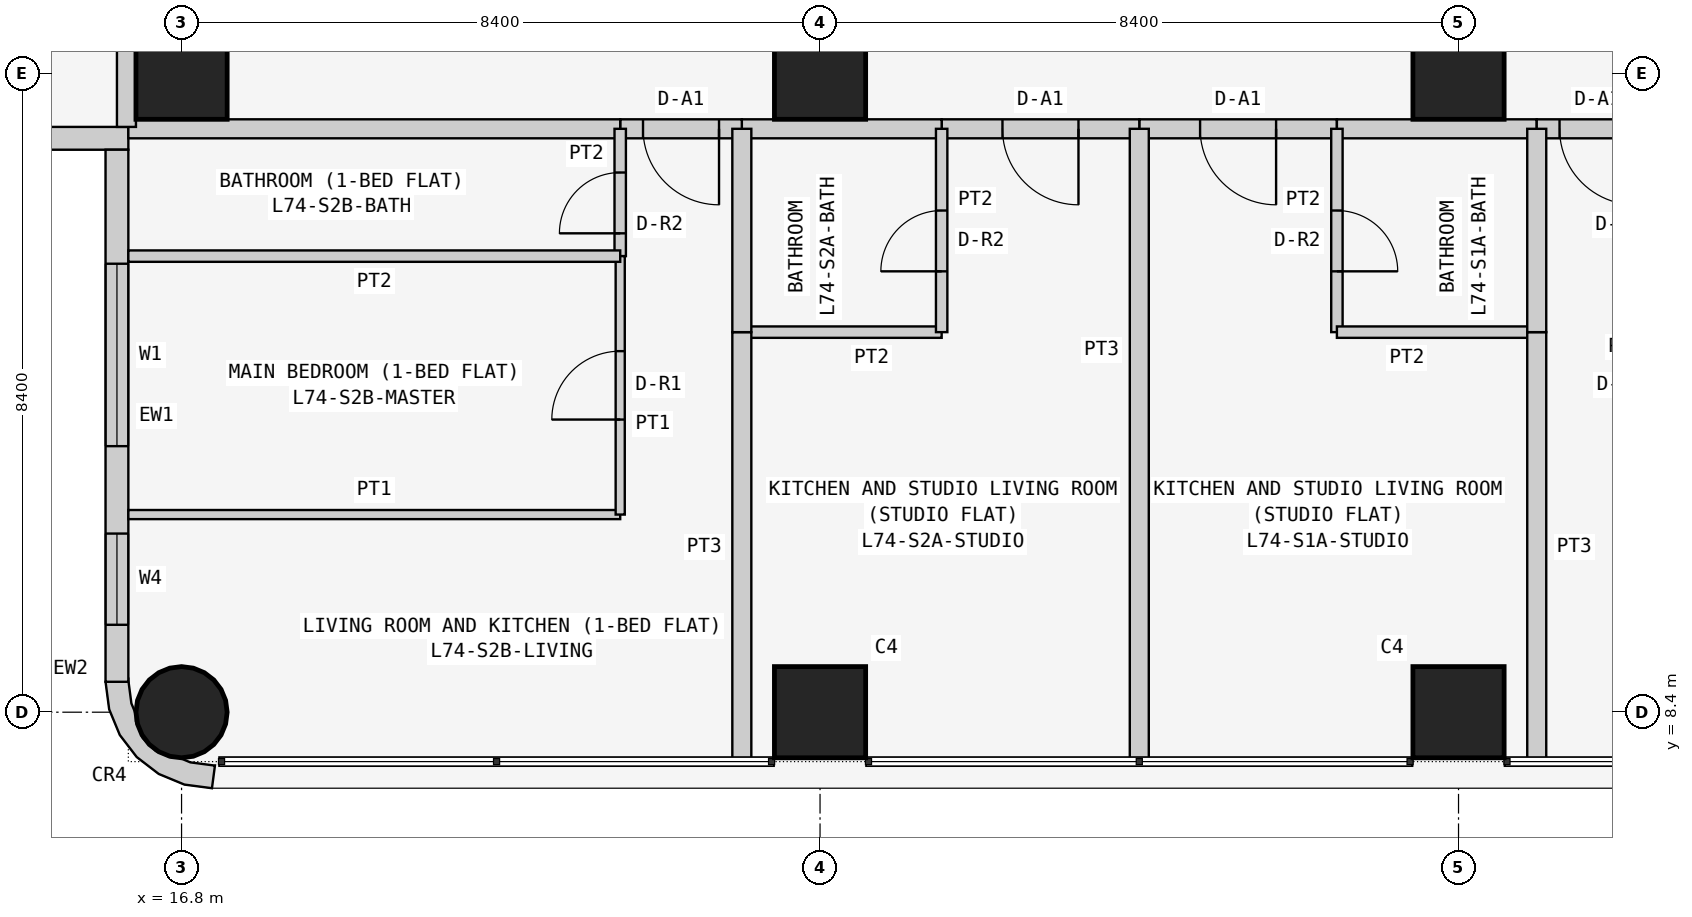
"""IFC4 building model, lengths in metres.
Left out: names, types, materials, properties, quantities, classifications, styles, units other than length and angle.
Written with IfcOpenShell. Run it as: python <this file> out.ifc"""

import sys

from ifc_helpers import new_model, si_unit, direction, frame, frame_2d, origin, origin_2d, place, context, subcontext, project, spatial, polyline, rectangle, circle, outline, extrude, element, fill, save


model = new_model("IFC4")
c1 = context("Model", 3, precision=1e-05, world=origin(), true_north=direction((0.0, 1.0)))
c2 = subcontext(c1, "Body", "Model", "MODEL_VIEW")
j1 = project(units=[si_unit("LENGTHUNIT", "METRE"), si_unit("PLANEANGLEUNIT", "RADIAN")], contexts=[c1])
p1 = place(None, origin())
s1 = spatial("IfcSite", under=j1, at=p1, CompositionType="ELEMENT")
p2 = place(p1, origin())
s2 = spatial("IfcBuilding", under=s1, at=p2, CompositionType="ELEMENT")
p3 = place(p2, frame((0.0, 0.0, 282.9)))
s3 = spatial("IfcBuildingStorey", under=s2, at=p3, CompositionType="ELEMENT", Elevation=282.9)
p4 = place(p3, frame((16.8, 8.4, 0.0), z_axis=(0.0, 0.0, 1.0), x_axis=(1.0, 0.0, 0.0)))
e1 = element("IfcColumn", 1, at=p4, inside=s3, PredefinedType="COLUMN", context=c2, shape_type="SweptSolid", body=[
    extrude(circle(Radius=0.6, at=origin_2d()), origin(), (0.0, 0.0, 1.0), 3.6),
])
for number, where, z_axis, x_axis in (
    (2, (16.8, 16.8, 0.0), (0.0, 0.0, 1.0), (1.0, 0.0, 0.0)),
    (3, (25.2, 8.4, 0.0), (0.0, 0.0, 1.0), (1.0, 0.0, 0.0)),
    (4, (25.2, 16.8, 0.0), (0.0, 0.0, 1.0), (1.0, 0.0, 0.0)),
    (5, (33.6, 8.4, 0.0), (0.0, 0.0, 1.0), (1.0, 0.0, 0.0)),
    (6, (33.6, 16.8, 0.0), (0.0, 0.0, 1.0), (1.0, 0.0, 0.0)),
):
    element("IfcColumn", number, at=place(p3, frame(where, z_axis=z_axis, x_axis=x_axis)), inside=s3, PredefinedType="COLUMN", context=c2, shape_type="SweptSolid", body=[
        extrude(rectangle(XDim=1.2, YDim=1.2, at=origin_2d()), origin(), (0.0, 0.0, 1.0), 3.6),
    ])
p5 = place(p3, frame((8.8, 15.95, 0.0), z_axis=(0.0, 0.0, 1.0), x_axis=(1.0, 0.0, 0.0)))
e7 = element("IfcWall", 7, at=p5, inside=s3, PredefinedType="SOLIDWALL", context=c2, shape_type="SweptSolid", body=[
    extrude(rectangle(XDim=7.3, YDim=0.3, at=frame_2d((3.65, 0.0))), origin(), (0.0, 0.0, 1.0), 3.45),
])
p6 = place(p5, frame((3.1, 0.0, 0.9)))
e8 = element("IfcOpeningElement", 8, at=p6, cuts=e7, PredefinedType="OPENING", context=c2, shape_type="SweptSolid", body=[
    extrude(rectangle(XDim=2.4, YDim=1.5, at=frame_2d((1.2, 0.75))), frame((0.0, 0.16, 0.0), z_axis=(0.0, -1.0, 0.0), x_axis=(1.0, 0.0, 0.0)), (0.0, 0.0, 1.0), 0.32),
])
p7 = place(p5, frame((0.75, 0.0, 0.9)))
e9 = element("IfcOpeningElement", 9, at=p7, cuts=e7, PredefinedType="OPENING", context=c2, shape_type="SweptSolid", body=[
    extrude(rectangle(XDim=1.2, YDim=1.5, at=frame_2d((0.6, 0.75))), frame((0.0, 0.16, 0.0), z_axis=(0.0, -1.0, 0.0), x_axis=(1.0, 0.0, 0.0)), (0.0, 0.0, 1.0), 0.32),
])
p8 = place(p3, frame((15.95, 15.8, 0.0), z_axis=(0.0, 0.0, 1.0), x_axis=(0.0, -1.0, 0.0)))
e10 = element("IfcWall", 10, at=p8, inside=s3, PredefinedType="SOLIDWALL", context=c2, shape_type="SweptSolid", body=[
    extrude(rectangle(XDim=7.0, YDim=0.3, at=frame_2d((3.5, 0.0))), origin(), (0.0, 0.0, 1.0), 3.45),
])
p9 = place(p8, frame((1.5, 0.0, 0.9)))
e11 = element("IfcOpeningElement", 11, at=p9, cuts=e10, PredefinedType="OPENING", context=c2, shape_type="SweptSolid", body=[
    extrude(rectangle(XDim=2.4, YDim=1.5, at=frame_2d((1.2, 0.75))), frame((0.0, 0.16, 0.0), z_axis=(0.0, -1.0, 0.0), x_axis=(1.0, 0.0, 0.0)), (0.0, 0.0, 1.0), 0.32),
])
p10 = place(p8, frame((5.05, 0.0, 0.9)))
e12 = element("IfcOpeningElement", 12, at=p10, cuts=e10, PredefinedType="OPENING", context=c2, shape_type="SweptSolid", body=[
    extrude(rectangle(XDim=1.2, YDim=1.5, at=frame_2d((0.6, 0.75))), frame((0.0, 0.16, 0.0), z_axis=(0.0, -1.0, 0.0), x_axis=(1.0, 0.0, 0.0)), (0.0, 0.0, 1.0), 0.32),
])
p11 = place(p3, frame((16.224, 8.762, 0.0), z_axis=(0.0, 0.0, 1.0), x_axis=(-0.707106781187, -0.707106781187, 0.0)))
e13 = element("IfcWall", 13, at=p11, inside=s3, PredefinedType="SOLIDWALL", context=c2, shape_type="SweptSolid", body=[
    extrude(outline(polyline([(0.033, 1.469), (0.047, 1.455), (0.233, 1.212), (0.292, 1.069), (0.358, 1.003), (0.449, 0.783), (0.449, 0.543), (0.358, 0.322), (0.292, 0.257), (0.233, 0.114), (0.047, -0.129), (0.033, -0.143), (0.273, -0.327), (0.495, -0.037), (0.635, 0.3), (0.683, 0.663), (0.635, 1.025), (0.495, 1.363), (0.273, 1.653), (0.033, 1.469)])), origin(), (0.0, 0.0, 1.0), 3.45),
])
p12 = place(p3, frame((32.0, 16.075, 0.0), z_axis=(0.0, 0.0, 1.0), x_axis=(-1.0, 0.0, 0.0)))
e14 = element("IfcWall", 14, at=p12, inside=s3, PredefinedType="PARTITIONING", context=c2, shape_type="SweptSolid", body=[
    extrude(rectangle(XDim=2.6, YDim=0.25, at=frame_2d((1.3, 0.0))), origin(), (0.0, 0.0, 1.0), 3.45),
])
p13 = place(p12, frame((0.8, 0.0, 0.0)))
e15 = element("IfcOpeningElement", 15, at=p13, cuts=e14, PredefinedType="OPENING", context=c2, shape_type="SweptSolid", body=[
    extrude(rectangle(XDim=1.0, YDim=2.1, at=frame_2d((0.5, 1.05))), frame((0.0, 0.135, 0.0), z_axis=(0.0, -1.0, 0.0), x_axis=(1.0, 0.0, 0.0)), (0.0, 0.0, 1.0), 0.27),
])
p14 = place(p3, frame((34.629, 16.075, 0.0), z_axis=(0.0, 0.0, 1.0), x_axis=(-1.0, 0.0, 0.0)))
e16 = element("IfcWall", 16, at=p14, inside=s3, PredefinedType="PARTITIONING", context=c2, shape_type="SweptSolid", body=[
    extrude(rectangle(XDim=2.629, YDim=0.25, at=frame_2d((1.314, 0.0))), origin(), (0.0, 0.0, 1.0), 3.45),
])
p15 = place(p3, frame((36.229, 16.075, 0.0), z_axis=(0.0, 0.0, 1.0), x_axis=(-1.0, 0.0, 0.0)))
e17 = element("IfcWall", 17, at=p15, inside=s3, PredefinedType="PARTITIONING", context=c2, shape_type="SweptSolid", body=[
    extrude(rectangle(XDim=1.6, YDim=0.25, at=frame_2d((0.8, 0.0))), origin(), (0.0, 0.0, 1.0), 3.45),
])
p16 = place(p15, frame((0.3, 0.0, 0.0)))
e18 = element("IfcOpeningElement", 18, at=p16, cuts=e17, PredefinedType="OPENING", context=c2, shape_type="SweptSolid", body=[
    extrude(rectangle(XDim=1.0, YDim=2.1, at=frame_2d((0.5, 1.05))), frame((0.0, 0.135, 0.0), z_axis=(0.0, -1.0, 0.0), x_axis=(1.0, 0.0, 0.0)), (0.0, 0.0, 1.0), 0.27),
])
p17 = place(p3, frame((29.4, 16.075, 0.0), z_axis=(0.0, 0.0, 1.0), x_axis=(-1.0, 0.0, 0.0)))
e19 = element("IfcWall", 19, at=p17, inside=s3, PredefinedType="PARTITIONING", context=c2, shape_type="SweptSolid", body=[
    extrude(rectangle(XDim=2.6, YDim=0.25, at=frame_2d((1.3, 0.0))), origin(), (0.0, 0.0, 1.0), 3.45),
])
p18 = place(p17, frame((0.8, 0.0, 0.0)))
e20 = element("IfcOpeningElement", 20, at=p18, cuts=e19, PredefinedType="OPENING", context=c2, shape_type="SweptSolid", body=[
    extrude(rectangle(XDim=1.0, YDim=2.1, at=frame_2d((0.5, 1.05))), frame((0.0, 0.135, 0.0), z_axis=(0.0, -1.0, 0.0), x_axis=(1.0, 0.0, 0.0)), (0.0, 0.0, 1.0), 0.27),
])
p19 = place(p3, frame((26.8, 16.075, 0.0), z_axis=(0.0, 0.0, 1.0), x_axis=(-1.0, 0.0, 0.0)))
e21 = element("IfcWall", 21, at=p19, inside=s3, PredefinedType="PARTITIONING", context=c2, shape_type="SweptSolid", body=[
    extrude(rectangle(XDim=2.629, YDim=0.25, at=frame_2d((1.314, 0.0))), origin(), (0.0, 0.0, 1.0), 3.45),
])
p20 = place(p3, frame((24.171, 16.075, 0.0), z_axis=(0.0, 0.0, 1.0), x_axis=(-1.0, 0.0, 0.0)))
e22 = element("IfcWall", 22, at=p20, inside=s3, PredefinedType="PARTITIONING", context=c2, shape_type="SweptSolid", body=[
    extrude(rectangle(XDim=1.6, YDim=0.25, at=frame_2d((0.8, 0.0))), origin(), (0.0, 0.0, 1.0), 3.45),
])
p21 = place(p20, frame((0.3, 0.0, 0.0)))
e23 = element("IfcOpeningElement", 23, at=p21, cuts=e22, PredefinedType="OPENING", context=c2, shape_type="SweptSolid", body=[
    extrude(rectangle(XDim=1.0, YDim=2.1, at=frame_2d((0.5, 1.05))), frame((0.0, 0.135, 0.0), z_axis=(0.0, -1.0, 0.0), x_axis=(1.0, 0.0, 0.0)), (0.0, 0.0, 1.0), 0.27),
])
p22 = place(p3, frame((22.571, 16.075, 0.0), z_axis=(0.0, 0.0, 1.0), x_axis=(-1.0, 0.0, 0.0)))
e24 = element("IfcWall", 24, at=p22, inside=s3, PredefinedType="PARTITIONING", context=c2, shape_type="SweptSolid", body=[
    extrude(rectangle(XDim=6.471, YDim=0.25, at=frame_2d((3.235, 0.0))), origin(), (0.0, 0.0, 1.0), 3.45),
])
p23 = place(p3, frame((16.075, 16.1, 0.0), z_axis=(0.0, 0.0, 1.0), x_axis=(0.0, 1.0, 0.0)))
e25 = element("IfcWall", 25, at=p23, inside=s3, PredefinedType="PARTITIONING", context=c2, shape_type="SweptSolid", body=[
    extrude(rectangle(XDim=6.871, YDim=0.25, at=frame_2d((3.436, 0.0))), origin(), (0.0, 0.0, 1.0), 3.45),
])
p24 = place(p3, frame((32.0, 16.075, 0.0), z_axis=(0.0, 0.0, 1.0), x_axis=(0.0, -1.0, 0.0)))
e26 = element("IfcWall", 26, at=p24, inside=s3, PredefinedType="PARTITIONING", context=c2, shape_type="SweptSolid", body=[
    extrude(rectangle(XDim=2.675, YDim=0.15, at=frame_2d((1.337, 0.0))), origin(), (0.0, 0.0, 1.0), 3.45),
])
p25 = place(p24, frame((1.075, 0.0, 0.0)))
e27 = element("IfcOpeningElement", 27, at=p25, cuts=e26, PredefinedType="OPENING", context=c2, shape_type="SweptSolid", body=[
    extrude(rectangle(XDim=0.8, YDim=2.1, at=frame_2d((0.4, 1.05))), frame((0.0, 0.085, 0.0), z_axis=(0.0, -1.0, 0.0), x_axis=(1.0, 0.0, 0.0)), (0.0, 0.0, 1.0), 0.17),
])
p26 = place(p3, frame((32.0, 13.4, 0.0), z_axis=(0.0, 0.0, 1.0), x_axis=(1.0, 0.0, 0.0)))
e28 = element("IfcWall", 28, at=p26, inside=s3, PredefinedType="PARTITIONING", context=c2, shape_type="SweptSolid", body=[
    extrude(rectangle(XDim=2.629, YDim=0.15, at=frame_2d((1.314, 0.0))), origin(), (0.0, 0.0, 1.0), 3.45),
])
p27 = place(p3, frame((34.629, 13.4, 0.0), z_axis=(0.0, 0.0, 1.0), x_axis=(0.0, -1.0, 0.0)))
e29 = element("IfcWall", 29, at=p27, inside=s3, PredefinedType="PARTITIONING", context=c2, shape_type="SweptSolid", body=[
    extrude(rectangle(XDim=5.65, YDim=0.25, at=frame_2d((2.825, 0.0))), origin(), (0.0, 0.0, 1.0), 3.45),
])
p28 = place(p3, frame((29.4, 7.75, 0.0), z_axis=(0.0, 0.0, 1.0), x_axis=(0.0, 1.0, 0.0)))
e30 = element("IfcWall", 30, at=p28, inside=s3, PredefinedType="PARTITIONING", context=c2, shape_type="SweptSolid", body=[
    extrude(rectangle(XDim=8.325, YDim=0.25, at=frame_2d((4.163, 0.0))), origin(), (0.0, 0.0, 1.0), 2.848),
])
p29 = place(p3, frame((34.629, 13.4, 0.0), z_axis=(0.0, 0.0, 1.0), x_axis=(0.0, 1.0, 0.0)))
e31 = element("IfcWall", 31, at=p29, inside=s3, PredefinedType="PARTITIONING", context=c2, shape_type="SweptSolid", body=[
    extrude(rectangle(XDim=2.675, YDim=0.25, at=frame_2d((1.337, 0.0))), origin(), (0.0, 0.0, 1.0), 3.45),
])
p30 = place(p3, frame((24.171, 13.4, 0.0), z_axis=(0.0, 0.0, 1.0), x_axis=(1.0, 0.0, 0.0)))
e32 = element("IfcWall", 32, at=p30, inside=s3, PredefinedType="PARTITIONING", context=c2, shape_type="SweptSolid", body=[
    extrude(rectangle(XDim=2.629, YDim=0.15, at=frame_2d((1.314, 0.0))), origin(), (0.0, 0.0, 1.0), 3.45),
])
p31 = place(p3, frame((26.8, 13.4, 0.0), z_axis=(0.0, 0.0, 1.0), x_axis=(0.0, 1.0, 0.0)))
e33 = element("IfcWall", 33, at=p31, inside=s3, PredefinedType="PARTITIONING", context=c2, shape_type="SweptSolid", body=[
    extrude(rectangle(XDim=2.675, YDim=0.15, at=frame_2d((1.337, 0.0))), origin(), (0.0, 0.0, 1.0), 3.45),
])
p32 = place(p31, frame((0.8, 0.0, 0.0)))
e34 = element("IfcOpeningElement", 34, at=p32, cuts=e33, PredefinedType="OPENING", context=c2, shape_type="SweptSolid", body=[
    extrude(rectangle(XDim=0.8, YDim=2.1, at=frame_2d((0.4, 1.05))), frame((0.0, 0.085, 0.0), z_axis=(0.0, -1.0, 0.0), x_axis=(1.0, 0.0, 0.0)), (0.0, 0.0, 1.0), 0.17),
])
p33 = place(p3, frame((24.171, 7.75, 0.0), z_axis=(0.0, 0.0, 1.0), x_axis=(0.0, 1.0, 0.0)))
e35 = element("IfcWall", 35, at=p33, inside=s3, PredefinedType="PARTITIONING", context=c2, shape_type="SweptSolid", body=[
    extrude(rectangle(XDim=5.65, YDim=0.25, at=frame_2d((2.825, 0.0))), origin(), (0.0, 0.0, 1.0), 3.45),
])
p34 = place(p3, frame((24.171, 13.4, 0.0), z_axis=(0.0, 0.0, 1.0), x_axis=(0.0, 1.0, 0.0)))
e36 = element("IfcWall", 36, at=p34, inside=s3, PredefinedType="PARTITIONING", context=c2, shape_type="SweptSolid", body=[
    extrude(rectangle(XDim=2.675, YDim=0.25, at=frame_2d((1.337, 0.0))), origin(), (0.0, 0.0, 1.0), 3.45),
])
p35 = place(p3, frame((22.571, 14.4, 0.0), z_axis=(0.0, 0.0, 1.0), x_axis=(0.0, 1.0, 0.0)))
e37 = element("IfcWall", 37, at=p35, inside=s3, PredefinedType="PARTITIONING", context=c2, shape_type="SweptSolid", body=[
    extrude(rectangle(XDim=1.675, YDim=0.15, at=frame_2d((0.837, 0.0))), origin(), (0.0, 0.0, 1.0), 3.45),
])
p36 = place(p35, frame((0.3, 0.0, 0.0)))
e38 = element("IfcOpeningElement", 38, at=p36, cuts=e37, PredefinedType="OPENING", context=c2, shape_type="SweptSolid", body=[
    extrude(rectangle(XDim=0.8, YDim=2.1, at=frame_2d((0.4, 1.05))), frame((0.0, 0.085, 0.0), z_axis=(0.0, -1.0, 0.0), x_axis=(1.0, 0.0, 0.0)), (0.0, 0.0, 1.0), 0.17),
])
p37 = place(p3, frame((16.1, 11.0, 0.0), z_axis=(0.0, 0.0, 1.0), x_axis=(1.0, 0.0, 0.0)))
e39 = element("IfcWall", 39, at=p37, inside=s3, PredefinedType="PARTITIONING", context=c2, shape_type="SweptSolid", body=[
    extrude(rectangle(XDim=6.471, YDim=0.12, at=frame_2d((3.235, 0.0))), origin(), (0.0, 0.0, 1.0), 3.45),
])
p38 = place(p3, frame((22.571, 11.0, 0.0), z_axis=(0.0, 0.0, 1.0), x_axis=(0.0, 1.0, 0.0)))
e40 = element("IfcWall", 40, at=p38, inside=s3, PredefinedType="PARTITIONING", context=c2, shape_type="SweptSolid", body=[
    extrude(rectangle(XDim=3.4, YDim=0.12, at=frame_2d((1.7, 0.0))), origin(), (0.0, 0.0, 1.0), 3.45),
])
p39 = place(p38, frame((1.25, 0.0, 0.0)))
e41 = element("IfcOpeningElement", 41, at=p39, cuts=e40, PredefinedType="OPENING", context=c2, shape_type="SweptSolid", body=[
    extrude(rectangle(XDim=0.9, YDim=2.1, at=frame_2d((0.45, 1.05))), frame((0.0, 0.07, 0.0), z_axis=(0.0, -1.0, 0.0), x_axis=(1.0, 0.0, 0.0)), (0.0, 0.0, 1.0), 0.14),
])
p40 = place(p3, frame((22.571, 14.4, 0.0), z_axis=(0.0, 0.0, 1.0), x_axis=(-1.0, 0.0, 0.0)))
e42 = element("IfcWall", 42, at=p40, inside=s3, PredefinedType="PARTITIONING", context=c2, shape_type="SweptSolid", body=[
    extrude(rectangle(XDim=6.471, YDim=0.15, at=frame_2d((3.235, 0.0))), origin(), (0.0, 0.0, 1.0), 3.45),
])
p41 = place(p9, origin())
e43 = element("IfcWindow", 43, at=p41, inside=s3, PartitioningType="SINGLE_PANEL", PredefinedType="WINDOW", context=c2, shape_type="SweptSolid", body=[
    extrude(rectangle(XDim=2.4, YDim=1.5, at=frame_2d((1.2, 0.75))), frame((0.0, 0.03, 0.0), z_axis=(0.0, -1.0, 0.0), x_axis=(1.0, 0.0, 0.0)), (0.0, 0.0, 1.0), 0.06),
])
fill(e11, e43)
p42 = place(p10, origin())
e44 = element("IfcWindow", 44, at=p42, inside=s3, PartitioningType="SINGLE_PANEL", PredefinedType="WINDOW", context=c2, shape_type="SweptSolid", body=[
    extrude(rectangle(XDim=1.2, YDim=1.5, at=frame_2d((0.6, 0.75))), frame((0.0, 0.03, 0.0), z_axis=(0.0, -1.0, 0.0), x_axis=(1.0, 0.0, 0.0)), (0.0, 0.0, 1.0), 0.06),
])
fill(e12, e44)
p43 = place(p13, origin())
e45 = element("IfcDoor", 45, at=p43, inside=s3, OperationType="SINGLE_SWING_LEFT", PredefinedType="DOOR", context=c2, shape_type="SweptSolid", body=[
    extrude(rectangle(XDim=1.0, YDim=2.1, at=frame_2d((0.5, 1.05))), frame((0.0, 0.025, 0.0), z_axis=(0.0, -1.0, 0.0), x_axis=(1.0, 0.0, 0.0)), (0.0, 0.0, 1.0), 0.05),
])
fill(e15, e45)
p44 = place(p25, origin())
e46 = element("IfcDoor", 46, at=p44, inside=s3, OperationType="SINGLE_SWING_RIGHT", PredefinedType="DOOR", context=c2, shape_type="SweptSolid", body=[
    extrude(rectangle(XDim=0.8, YDim=2.1, at=frame_2d((0.4, 1.05))), frame((0.0, 0.025, 0.0), z_axis=(0.0, -1.0, 0.0), x_axis=(1.0, 0.0, 0.0)), (0.0, 0.0, 1.0), 0.05),
])
fill(e27, e46)
p45 = place(p16, origin())
e47 = element("IfcDoor", 47, at=p45, inside=s3, OperationType="SINGLE_SWING_LEFT", PredefinedType="DOOR", context=c2, shape_type="SweptSolid", body=[
    extrude(rectangle(XDim=1.0, YDim=2.1, at=frame_2d((0.5, 1.05))), frame((0.0, 0.025, 0.0), z_axis=(0.0, -1.0, 0.0), x_axis=(1.0, 0.0, 0.0)), (0.0, 0.0, 1.0), 0.05),
])
fill(e18, e47)
p46 = place(p18, origin())
e48 = element("IfcDoor", 48, at=p46, inside=s3, OperationType="SINGLE_SWING_LEFT", PredefinedType="DOOR", context=c2, shape_type="SweptSolid", body=[
    extrude(rectangle(XDim=1.0, YDim=2.1, at=frame_2d((0.5, 1.05))), frame((0.0, 0.025, 0.0), z_axis=(0.0, -1.0, 0.0), x_axis=(1.0, 0.0, 0.0)), (0.0, 0.0, 1.0), 0.05),
])
fill(e20, e48)
p47 = place(p32, origin())
e49 = element("IfcDoor", 49, at=p47, inside=s3, OperationType="SINGLE_SWING_LEFT", PredefinedType="DOOR", context=c2, shape_type="SweptSolid", body=[
    extrude(rectangle(XDim=0.8, YDim=2.1, at=frame_2d((0.4, 1.05))), frame((0.0, 0.025, 0.0), z_axis=(0.0, -1.0, 0.0), x_axis=(1.0, 0.0, 0.0)), (0.0, 0.0, 1.0), 0.05),
])
fill(e34, e49)
p48 = place(p21, origin())
e50 = element("IfcDoor", 50, at=p48, inside=s3, OperationType="SINGLE_SWING_LEFT", PredefinedType="DOOR", context=c2, shape_type="SweptSolid", body=[
    extrude(rectangle(XDim=1.0, YDim=2.1, at=frame_2d((0.5, 1.05))), frame((0.0, 0.025, 0.0), z_axis=(0.0, -1.0, 0.0), x_axis=(1.0, 0.0, 0.0)), (0.0, 0.0, 1.0), 0.05),
])
fill(e23, e50)
p49 = place(p36, origin())
e51 = element("IfcDoor", 51, at=p49, inside=s3, OperationType="SINGLE_SWING_LEFT", PredefinedType="DOOR", context=c2, shape_type="SweptSolid", body=[
    extrude(rectangle(XDim=0.8, YDim=2.1, at=frame_2d((0.4, 1.05))), frame((0.0, 0.025, 0.0), z_axis=(0.0, -1.0, 0.0), x_axis=(1.0, 0.0, 0.0)), (0.0, 0.0, 1.0), 0.05),
])
fill(e38, e51)
p50 = place(p39, origin())
e52 = element("IfcDoor", 52, at=p50, inside=s3, OperationType="SINGLE_SWING_LEFT", PredefinedType="DOOR", context=c2, shape_type="SweptSolid", body=[
    extrude(rectangle(XDim=0.9, YDim=2.1, at=frame_2d((0.45, 1.05))), frame((0.0, 0.025, 0.0), z_axis=(0.0, -1.0, 0.0), x_axis=(1.0, 0.0, 0.0)), (0.0, 0.0, 1.0), 0.05),
])
fill(e41, e52)
save(model, sys.argv[1])
